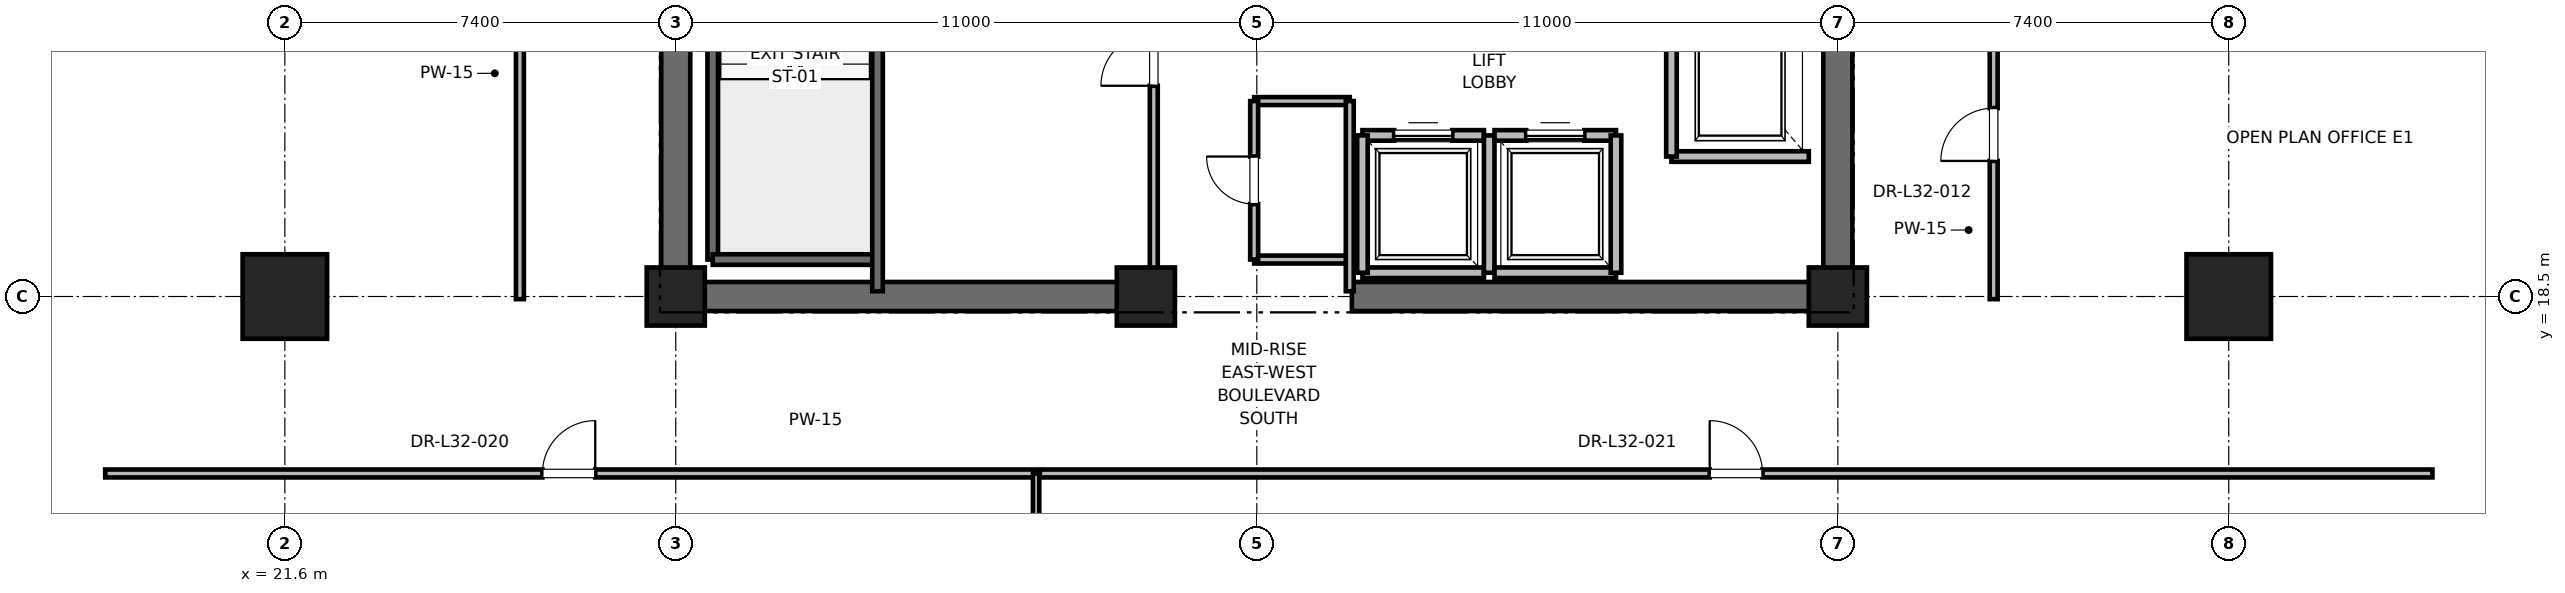
"""IFC4 building model, lengths in metres.
Left out: names, types, materials, properties, quantities, classifications, styles, units other than length and angle.
Written with IfcOpenShell. Run it as: python <this file> out.ifc"""

import sys

from ifc_helpers import new_model, si_unit, direction, frame, frame_2d, origin, origin_2d, place, context, subcontext, project, spatial, rectangle, extrude, element, fill, save


model = new_model("IFC4")
c1 = context("Model", 3, precision=1e-05, world=origin(), true_north=direction((0.0, 1.0)))
c2 = subcontext(c1, "Body", "Model", "MODEL_VIEW")
j1 = project(units=[si_unit("LENGTHUNIT", "METRE"), si_unit("PLANEANGLEUNIT", "RADIAN")], contexts=[c1])
p1 = place(None, origin())
s1 = spatial("IfcSite", under=j1, at=p1, CompositionType="ELEMENT")
p2 = place(p1, origin())
s2 = spatial("IfcBuilding", under=s1, at=p2, CompositionType="ELEMENT")
p3 = place(p2, frame((0.0, 0.0, 140.4)))
s3 = spatial("IfcBuildingStorey", under=s2, at=p3, CompositionType="ELEMENT", Elevation=140.4)
for number, where, z_axis, x_axis in (
    (1, (21.6, 18.5, 0.0), (0.0, 0.0, 1.0), (1.0, 0.0, 0.0)),
    (2, (58.4, 18.5, 0.0), (0.0, 0.0, 1.0), (1.0, 0.0, 0.0)),
):
    element("IfcColumn", number, at=place(p3, frame(where, z_axis=z_axis, x_axis=x_axis)), inside=s3, PredefinedType="COLUMN", context=c2, shape_type="SweptSolid", body=[
        extrude(rectangle(XDim=1.6, YDim=1.6, at=origin_2d()), origin(), (0.0, 0.0, 1.0), 4.0),
    ])
for number, where, z_axis, x_axis in (
    (3, (29.0, 18.5, 0.0), (0.0, 0.0, 1.0), (1.0, 0.0, 0.0)),
    (4, (51.0, 18.5, 0.0), (0.0, 0.0, 1.0), (1.0, 0.0, 0.0)),
    (5, (37.9, 18.5, 0.0), (0.0, 0.0, 1.0), (1.0, 0.0, 0.0)),
):
    element("IfcColumn", number, at=place(p3, frame(where, z_axis=z_axis, x_axis=x_axis)), inside=s3, PredefinedType="PILASTER", context=c2, shape_type="SweptSolid", body=[
        extrude(rectangle(XDim=1.1, YDim=1.1, at=origin_2d()), origin(), (0.0, 0.0, 1.0), 4.0),
    ])
for number, where, z_axis, x_axis in (
    (6, (29.0, 18.5, 0.0), (0.0, 0.0, 1.0), (1.0, 0.0, 0.0)),
    (7, (41.8, 18.5, 0.0), (0.0, 0.0, 1.0), (1.0, 0.0, 0.0)),
):
    element("IfcWall", number, at=place(p3, frame(where, z_axis=z_axis, x_axis=x_axis)), inside=s3, PredefinedType="SHEAR", context=c2, shape_type="SweptSolid", body=[
        extrude(rectangle(XDim=9.2, YDim=0.55, at=frame_2d((4.6, 0.0))), origin(), (0.0, 0.0, 1.0), 3.775),
    ])
p4 = place(p3, frame((29.0, 18.5, 0.0), z_axis=(0.0, 0.0, 1.0), x_axis=(0.0, 1.0, 0.0)))
e8 = element("IfcWall", 8, at=p4, inside=s3, PredefinedType="SHEAR", context=c2, shape_type="SweptSolid", body=[
    extrude(rectangle(XDim=8.8, YDim=0.55, at=frame_2d((4.4, 0.0))), origin(), (0.0, 0.0, 1.0), 3.775),
])
p5 = place(p3, frame((51.0, 18.5, 0.0), z_axis=(0.0, 0.0, 1.0), x_axis=(0.0, 1.0, 0.0)))
e9 = element("IfcWall", 9, at=p5, inside=s3, PredefinedType="SHEAR", context=c2, shape_type="SweptSolid", body=[
    extrude(rectangle(XDim=5.8, YDim=0.55, at=frame_2d((2.9, 0.0))), origin(), (0.0, 0.0, 1.0), 3.775),
])
p6 = place(p3, frame((29.7, 19.2, 0.0), z_axis=(0.0, 0.0, 1.0), x_axis=(0.0, 1.0, 0.0)))
e10 = element("IfcWall", 10, at=p6, inside=s3, PredefinedType="SOLIDWALL", context=c2, shape_type="SweptSolid", body=[
    extrude(rectangle(XDim=8.15, YDim=0.2, at=frame_2d((4.075, 0.0))), origin(), (0.0, 0.0, 1.0), 3.775),
])
p7 = place(p3, frame((29.7, 19.2, 0.0), z_axis=(0.0, 0.0, 1.0), x_axis=(1.0, 0.0, 0.0)))
e11 = element("IfcWall", 11, at=p7, inside=s3, PredefinedType="SOLIDWALL", context=c2, shape_type="SweptSolid", body=[
    extrude(rectangle(XDim=3.12, YDim=0.2, at=frame_2d((1.56, 0.0))), origin(), (0.0, 0.0, 1.0), 3.775),
])
p8 = place(p3, frame((32.82, 18.6, 0.0), z_axis=(0.0, 0.0, 1.0), x_axis=(0.0, 1.0, 0.0)))
e12 = element("IfcWall", 12, at=p8, inside=s3, PredefinedType="SOLIDWALL", context=c2, shape_type="SweptSolid", body=[
    extrude(rectangle(XDim=8.78, YDim=0.2, at=frame_2d((4.39, 0.0))), origin(), (0.0, 0.0, 1.0), 3.775),
])
p9 = place(p3, frame((47.85, 21.15, 0.0), z_axis=(0.0, 0.0, 1.0), x_axis=(1.0, 0.0, 0.0)))
e13 = element("IfcWall", 13, at=p9, inside=s3, PredefinedType="SOLIDWALL", context=c2, shape_type="SweptSolid", body=[
    extrude(rectangle(XDim=2.6, YDim=0.2, at=frame_2d((1.3, 0.0))), origin(), (0.0, 0.0, 1.0), 3.775),
])
p10 = place(p3, frame((47.85, 24.15, 0.0), z_axis=(0.0, 0.0, 1.0), x_axis=(0.0, -1.0, 0.0)))
e14 = element("IfcWall", 14, at=p10, inside=s3, PredefinedType="SOLIDWALL", context=c2, shape_type="SweptSolid", body=[
    extrude(rectangle(XDim=3.0, YDim=0.2, at=frame_2d((1.5, 0.0))), origin(), (0.0, 0.0, 1.0), 3.775),
])
p11 = place(p3, frame((42.0, 18.95, 0.0), z_axis=(0.0, 0.0, 1.0), x_axis=(1.0, 0.0, 0.0)))
e15 = element("IfcWall", 15, at=p11, inside=s3, PredefinedType="SOLIDWALL", context=c2, shape_type="SweptSolid", body=[
    extrude(rectangle(XDim=2.3, YDim=0.2, at=frame_2d((1.15, 0.0))), origin(), (0.0, 0.0, 1.0), 2.755),
])
p12 = place(p3, frame((44.3, 21.55, 0.0), z_axis=(0.0, 0.0, 1.0), x_axis=(-1.0, 0.0, 0.0)))
e16 = element("IfcWall", 16, at=p12, inside=s3, PredefinedType="SOLIDWALL", context=c2, shape_type="SweptSolid", body=[
    extrude(rectangle(XDim=2.3, YDim=0.2, at=frame_2d((1.15, 0.0))), origin(), (0.0, 0.0, 1.0), 3.775),
])
p13 = place(p12, frame((0.6, 0.0, 0.0)))
e17 = element("IfcOpeningElement", 17, at=p13, cuts=e16, PredefinedType="OPENING", context=c2, shape_type="SweptSolid", body=[
    extrude(rectangle(XDim=1.1, YDim=2.2, at=frame_2d((0.55, 1.1))), frame((0.0, 0.1, 0.0), z_axis=(0.0, -1.0, 0.0), x_axis=(1.0, 0.0, 0.0)), (0.0, 0.0, 1.0), 0.2),
])
p14 = place(p3, frame((42.0, 21.55, 0.0), z_axis=(0.0, 0.0, 1.0), x_axis=(0.0, -1.0, 0.0)))
e18 = element("IfcWall", 18, at=p14, inside=s3, PredefinedType="SOLIDWALL", context=c2, shape_type="SweptSolid", body=[
    extrude(rectangle(XDim=2.6, YDim=0.2, at=frame_2d((1.3, 0.0))), origin(), (0.0, 0.0, 1.0), 2.755),
])
p15 = place(p3, frame((44.4, 18.95, 0.0), z_axis=(0.0, 0.0, 1.0), x_axis=(0.0, 1.0, 0.0)))
e19 = element("IfcWall", 19, at=p15, inside=s3, PredefinedType="SOLIDWALL", context=c2, shape_type="SweptSolid", body=[
    extrude(rectangle(XDim=2.6, YDim=0.2, at=frame_2d((1.3, 0.0))), origin(), (0.0, 0.0, 1.0), 3.775),
])
p16 = place(p3, frame((44.5, 18.95, 0.0), z_axis=(0.0, 0.0, 1.0), x_axis=(1.0, 0.0, 0.0)))
e20 = element("IfcWall", 20, at=p16, inside=s3, PredefinedType="SOLIDWALL", context=c2, shape_type="SweptSolid", body=[
    extrude(rectangle(XDim=2.3, YDim=0.2, at=frame_2d((1.15, 0.0))), origin(), (0.0, 0.0, 1.0), 3.775),
])
p17 = place(p3, frame((46.8, 21.55, 0.0), z_axis=(0.0, 0.0, 1.0), x_axis=(-1.0, 0.0, 0.0)))
e21 = element("IfcWall", 21, at=p17, inside=s3, PredefinedType="SOLIDWALL", context=c2, shape_type="SweptSolid", body=[
    extrude(rectangle(XDim=2.3, YDim=0.2, at=frame_2d((1.15, 0.0))), origin(), (0.0, 0.0, 1.0), 3.775),
])
p18 = place(p17, frame((0.6, 0.0, 0.0)))
e22 = element("IfcOpeningElement", 22, at=p18, cuts=e21, PredefinedType="OPENING", context=c2, shape_type="SweptSolid", body=[
    extrude(rectangle(XDim=1.1, YDim=2.2, at=frame_2d((0.55, 1.1))), frame((0.0, 0.1, 0.0), z_axis=(0.0, -1.0, 0.0), x_axis=(1.0, 0.0, 0.0)), (0.0, 0.0, 1.0), 0.2),
])
p19 = place(p3, frame((46.8, 18.95, 0.0), z_axis=(0.0, 0.0, 1.0), x_axis=(0.0, 1.0, 0.0)))
e23 = element("IfcWall", 23, at=p19, inside=s3, PredefinedType="SOLIDWALL", context=c2, shape_type="SweptSolid", body=[
    extrude(rectangle(XDim=2.6, YDim=0.2, at=frame_2d((1.3, 0.0))), origin(), (0.0, 0.0, 1.0), 3.775),
])
for number, where, z_axis, x_axis in (
    (24, (39.95, 19.2, 0.0), (0.0, 0.0, 1.0), (1.0, 0.0, 0.0)),
    (25, (39.95, 22.2, 0.0), (0.0, 0.0, 1.0), (1.0, 0.0, 0.0)),
):
    element("IfcWall", number, at=place(p3, frame(where, z_axis=z_axis, x_axis=x_axis)), inside=s3, PredefinedType="PARTITIONING", context=c2, shape_type="SweptSolid", body=[
        extrude(rectangle(XDim=1.81, YDim=0.15, at=frame_2d((0.905, 0.0))), origin(), (0.0, 0.0, 1.0), 2.85),
    ])
p20 = place(p3, frame((41.76, 18.6, 0.0), z_axis=(0.0, 0.0, 1.0), x_axis=(0.0, 1.0, 0.0)))
e26 = element("IfcWall", 26, at=p20, inside=s3, PredefinedType="PARTITIONING", context=c2, shape_type="SweptSolid", body=[
    extrude(rectangle(XDim=3.6, YDim=0.15, at=frame_2d((1.8, 0.0))), origin(), (0.0, 0.0, 1.0), 2.755),
])
p21 = place(p3, frame((39.95, 19.2, 0.0), z_axis=(0.0, 0.0, 1.0), x_axis=(0.0, 1.0, 0.0)))
e27 = element("IfcWall", 27, at=p21, inside=s3, PredefinedType="PARTITIONING", context=c2, shape_type="SweptSolid", body=[
    extrude(rectangle(XDim=3.0, YDim=0.15, at=frame_2d((1.5, 0.0))), origin(), (0.0, 0.0, 1.0), 2.85),
])
p22 = place(p21, frame((1.05, 0.0, 0.0)))
e28 = element("IfcOpeningElement", 28, at=p22, cuts=e27, PredefinedType="OPENING", context=c2, shape_type="SweptSolid", body=[
    extrude(rectangle(XDim=0.9, YDim=2.1, at=frame_2d((0.45, 1.05))), frame((0.0, 0.075, 0.0), z_axis=(0.0, -1.0, 0.0), x_axis=(1.0, 0.0, 0.0)), (0.0, 0.0, 1.0), 0.15),
])
p23 = place(p3, frame((38.05, 18.6, 0.0), z_axis=(0.0, 0.0, 1.0), x_axis=(0.0, 1.0, 0.0)))
e29 = element("IfcWall", 29, at=p23, inside=s3, PredefinedType="PARTITIONING", context=c2, shape_type="SweptSolid", body=[
    extrude(rectangle(XDim=8.78, YDim=0.15, at=frame_2d((4.39, 0.0))), origin(), (0.0, 0.0, 1.0), 2.755),
])
p24 = place(p23, frame((3.89, 0.0, 0.0)))
e30 = element("IfcOpeningElement", 30, at=p24, cuts=e29, PredefinedType="OPENING", context=c2, shape_type="SweptSolid", body=[
    extrude(rectangle(XDim=1.0, YDim=2.15, at=frame_2d((0.5, 1.075))), frame((0.0, 0.075, 0.0), z_axis=(0.0, -1.0, 0.0), x_axis=(1.0, 0.0, 0.0)), (0.0, 0.0, 1.0), 0.15),
])
p25 = place(p3, frame((18.199, 15.15, 0.0), z_axis=(0.0, 0.0, 1.0), x_axis=(1.0, 0.0, 0.0)))
e31 = element("IfcWall", 31, at=p25, inside=s3, PredefinedType="PARTITIONING", context=c2, shape_type="SweptSolid", body=[
    extrude(rectangle(XDim=17.623, YDim=0.15, at=frame_2d((8.812, 0.0))), origin(), (0.0, 0.0, 1.0), 2.85),
])
p26 = place(p25, frame((8.277, 0.0, 0.0)))
e32 = element("IfcOpeningElement", 32, at=p26, cuts=e31, PredefinedType="OPENING", context=c2, shape_type="SweptSolid", body=[
    extrude(rectangle(XDim=1.0, YDim=2.15, at=frame_2d((0.5, 1.075))), frame((0.0, 0.075, 0.0), z_axis=(0.0, -1.0, 0.0), x_axis=(1.0, 0.0, 0.0)), (0.0, 0.0, 1.0), 0.15),
])
p27 = place(p3, frame((35.822, 5.159, 0.0), z_axis=(0.0, 0.0, 1.0), x_axis=(0.0, 1.0, 0.0)))
e33 = element("IfcWall", 33, at=p27, inside=s3, PredefinedType="PARTITIONING", context=c2, shape_type="SweptSolid", body=[
    extrude(rectangle(XDim=9.991, YDim=0.12, at=frame_2d((4.995, 0.0))), origin(), (0.0, 0.0, 1.0), 2.405),
])
p28 = place(p3, frame((35.892, 15.15, 0.0), z_axis=(0.0, 0.0, 1.0), x_axis=(1.0, 0.0, 0.0)))
e34 = element("IfcWall", 34, at=p28, inside=s3, PredefinedType="PARTITIONING", context=c2, shape_type="SweptSolid", body=[
    extrude(rectangle(XDim=26.364, YDim=0.15, at=frame_2d((13.182, 0.0))), origin(), (0.0, 0.0, 1.0), 2.85),
])
p29 = place(p28, frame((12.682, 0.0, 0.0)))
e35 = element("IfcOpeningElement", 35, at=p29, cuts=e34, PredefinedType="OPENING", context=c2, shape_type="SweptSolid", body=[
    extrude(rectangle(XDim=1.0, YDim=2.15, at=frame_2d((0.5, 1.075))), frame((0.0, 0.075, 0.0), z_axis=(0.0, -1.0, 0.0), x_axis=(1.0, 0.0, 0.0)), (0.0, 0.0, 1.0), 0.15),
])
p30 = place(p3, frame((26.05, 18.45, 0.0), z_axis=(0.0, 0.0, 1.0), x_axis=(0.0, 1.0, 0.0)))
e36 = element("IfcWall", 36, at=p30, inside=s3, PredefinedType="PARTITIONING", context=c2, shape_type="SweptSolid", body=[
    extrude(rectangle(XDim=18.1, YDim=0.15, at=frame_2d((9.05, 0.0))), origin(), (0.0, 0.0, 1.0), 2.85),
])
p31 = place(p30, frame((8.55, 0.0, 0.0)))
e37 = element("IfcOpeningElement", 37, at=p31, cuts=e36, PredefinedType="OPENING", context=c2, shape_type="SweptSolid", body=[
    extrude(rectangle(XDim=1.0, YDim=2.15, at=frame_2d((0.5, 1.075))), frame((0.0, 0.075, 0.0), z_axis=(0.0, -1.0, 0.0), x_axis=(1.0, 0.0, 0.0)), (0.0, 0.0, 1.0), 0.15),
])
p32 = place(p3, frame((53.95, 18.45, 0.0), z_axis=(0.0, 0.0, 1.0), x_axis=(0.0, 1.0, 0.0)))
e38 = element("IfcWall", 38, at=p32, inside=s3, PredefinedType="PARTITIONING", context=c2, shape_type="SweptSolid", body=[
    extrude(rectangle(XDim=6.154, YDim=0.15, at=frame_2d((3.077, 0.0))), origin(), (0.0, 0.0, 1.0), 2.85),
])
p33 = place(p32, frame((2.617, 0.0, 0.0)))
e39 = element("IfcOpeningElement", 39, at=p33, cuts=e38, PredefinedType="OPENING", context=c2, shape_type="SweptSolid", body=[
    extrude(rectangle(XDim=1.0, YDim=2.15, at=frame_2d((0.5, 1.075))), frame((0.0, 0.075, 0.0), z_axis=(0.0, -1.0, 0.0), x_axis=(1.0, 0.0, 0.0)), (0.0, 0.0, 1.0), 0.15),
])
p34 = place(p13, origin())
e40 = element("IfcDoor", 40, at=p34, inside=s3, OperationType="SLIDING_TO_RIGHT", PredefinedType="DOOR", context=c2, shape_type="SweptSolid", body=[
    extrude(rectangle(XDim=1.1, YDim=2.2, at=frame_2d((0.55, 1.1))), frame((0.0, 0.025, 0.0), z_axis=(0.0, -1.0, 0.0), x_axis=(1.0, 0.0, 0.0)), (0.0, 0.0, 1.0), 0.05),
])
fill(e17, e40)
p35 = place(p18, origin())
e41 = element("IfcDoor", 41, at=p35, inside=s3, OperationType="SLIDING_TO_RIGHT", PredefinedType="DOOR", context=c2, shape_type="SweptSolid", body=[
    extrude(rectangle(XDim=1.1, YDim=2.2, at=frame_2d((0.55, 1.1))), frame((0.0, 0.025, 0.0), z_axis=(0.0, -1.0, 0.0), x_axis=(1.0, 0.0, 0.0)), (0.0, 0.0, 1.0), 0.05),
])
fill(e22, e41)
p36 = place(p22, origin())
e42 = element("IfcDoor", 42, at=p36, inside=s3, OperationType="SINGLE_SWING_RIGHT", PredefinedType="DOOR", context=c2, shape_type="SweptSolid", body=[
    extrude(rectangle(XDim=0.9, YDim=2.1, at=frame_2d((0.45, 1.05))), frame((0.0, 0.025, 0.0), z_axis=(0.0, -1.0, 0.0), x_axis=(1.0, 0.0, 0.0)), (0.0, 0.0, 1.0), 0.05),
])
fill(e28, e42)
p37 = place(p24, origin())
e43 = element("IfcDoor", 43, at=p37, inside=s3, OperationType="SINGLE_SWING_LEFT", PredefinedType="DOOR", context=c2, shape_type="SweptSolid", body=[
    extrude(rectangle(XDim=1.0, YDim=2.15, at=frame_2d((0.5, 1.075))), frame((0.0, 0.025, 0.0), z_axis=(0.0, -1.0, 0.0), x_axis=(1.0, 0.0, 0.0)), (0.0, 0.0, 1.0), 0.05),
])
fill(e30, e43)
p38 = place(p26, origin())
e44 = element("IfcDoor", 44, at=p38, inside=s3, OperationType="SINGLE_SWING_RIGHT", PredefinedType="DOOR", context=c2, shape_type="SweptSolid", body=[
    extrude(rectangle(XDim=1.0, YDim=2.15, at=frame_2d((0.5, 1.075))), frame((0.0, 0.025, 0.0), z_axis=(0.0, -1.0, 0.0), x_axis=(1.0, 0.0, 0.0)), (0.0, 0.0, 1.0), 0.05),
])
fill(e32, e44)
p39 = place(p29, origin())
e45 = element("IfcDoor", 45, at=p39, inside=s3, OperationType="SINGLE_SWING_LEFT", PredefinedType="DOOR", context=c2, shape_type="SweptSolid", body=[
    extrude(rectangle(XDim=1.0, YDim=2.15, at=frame_2d((0.5, 1.075))), frame((0.0, 0.025, 0.0), z_axis=(0.0, -1.0, 0.0), x_axis=(1.0, 0.0, 0.0)), (0.0, 0.0, 1.0), 0.05),
])
fill(e35, e45)
p40 = place(p33, origin())
e46 = element("IfcDoor", 46, at=p40, inside=s3, OperationType="SINGLE_SWING_LEFT", PredefinedType="DOOR", context=c2, shape_type="SweptSolid", body=[
    extrude(rectangle(XDim=1.0, YDim=2.15, at=frame_2d((0.5, 1.075))), frame((0.0, 0.025, 0.0), z_axis=(0.0, -1.0, 0.0), x_axis=(1.0, 0.0, 0.0)), (0.0, 0.0, 1.0), 0.05),
])
fill(e39, e46)
save(model, sys.argv[1])
